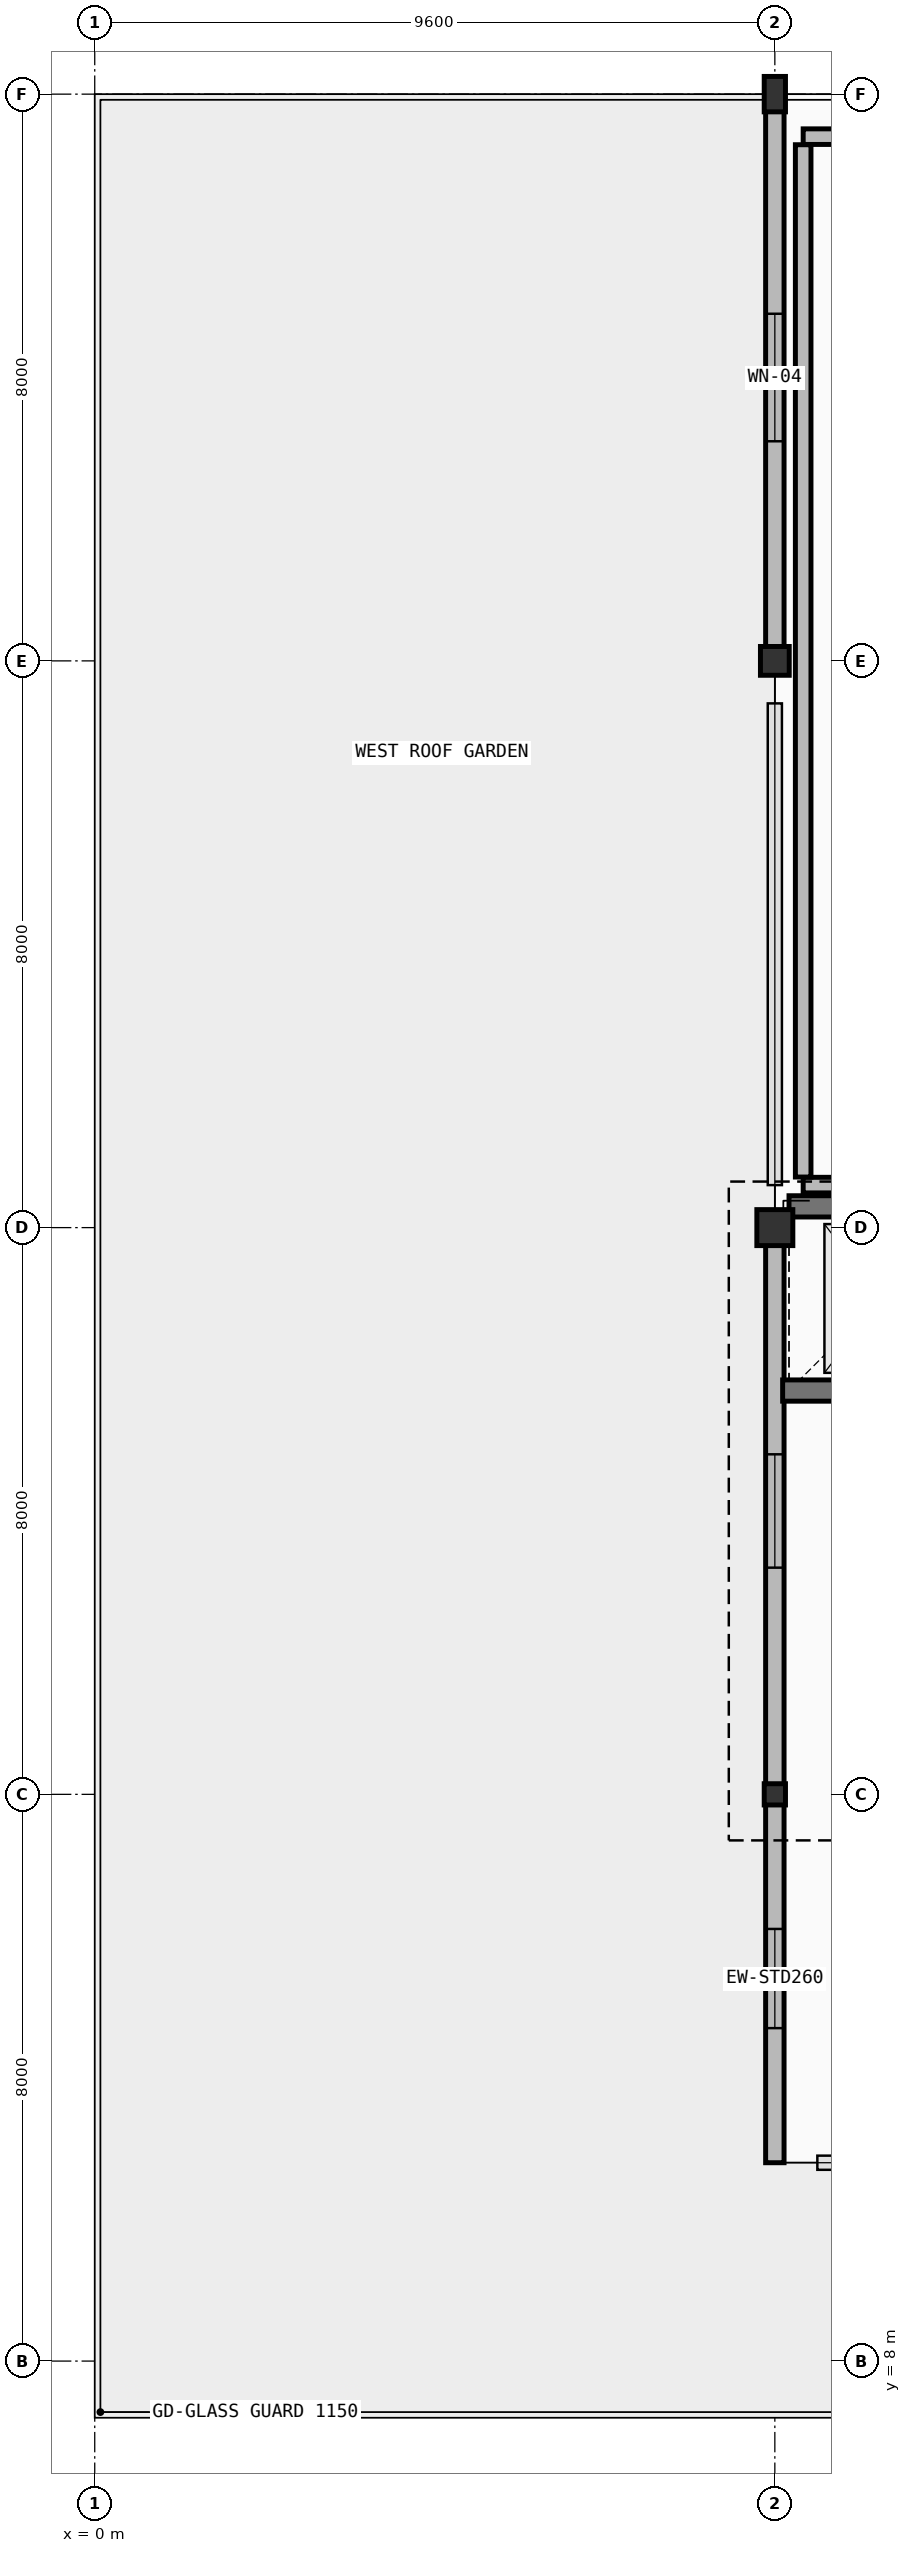
"""IFC4 building model, lengths in metres.
Left out: names, types, materials, properties, quantities, classifications, styles, units other than length and angle.
Written with IfcOpenShell. Run it as: python <this file> out.ifc"""

import sys

from ifc_helpers import new_model, si_unit, direction, frame, frame_2d, origin, origin_2d, place, context, subcontext, project, spatial, rectangle, hollow_circle, i_section, extrude, element, fill, save


model = new_model("IFC4")
c1 = context("Model", 3, precision=1e-05, world=origin(), true_north=direction((0.0, 1.0)))
c2 = subcontext(c1, "Body", "Model", "MODEL_VIEW")
j1 = project(units=[si_unit("LENGTHUNIT", "METRE"), si_unit("PLANEANGLEUNIT", "RADIAN")], contexts=[c1])
p1 = place(None, origin())
s1 = spatial("IfcSite", under=j1, at=p1, CompositionType="ELEMENT")
p2 = place(p1, origin())
s2 = spatial("IfcBuilding", under=s1, at=p2, CompositionType="ELEMENT")
p3 = place(p2, frame((0.0, 0.0, 24.9)))
s3 = spatial("IfcBuildingStorey", under=s2, at=p3, CompositionType="ELEMENT", Elevation=24.9)
p4 = place(p3, frame((9.6, 16.0, 0.0), z_axis=(0.0, 0.0, 1.0), x_axis=(1.0, 0.0, 0.0)))
e1 = element("IfcColumn", 1, at=p4, inside=s3, PredefinedType="COLUMN", context=c2, shape_type="SweptSolid", body=[
    extrude(i_section(OverallWidth=0.3, OverallDepth=0.3, WebThickness=0.011, FlangeThickness=0.019, FilletRadius=0.027, at=origin_2d()), origin(), (0.0, 0.0, 1.0), 4.5),
])
p5 = place(p3, frame((9.6, 24.0, 0.0), z_axis=(0.0, 0.0, 1.0), x_axis=(1.0, 0.0, 0.0)))
e2 = element("IfcColumn", 2, at=p5, inside=s3, PredefinedType="COLUMN", context=c2, shape_type="SweptSolid", body=[
    extrude(hollow_circle(Radius=0.254, WallThickness=0.025, at=origin_2d()), origin(), (0.0, 0.0, 1.0), 4.5),
])
p6 = place(p3, frame((9.6, 32.0, 0.0), z_axis=(0.0, 0.0, 1.0), x_axis=(1.0, 0.0, 0.0)))
e3 = element("IfcColumn", 3, at=p6, inside=s3, PredefinedType="COLUMN", context=c2, shape_type="SweptSolid", body=[
    extrude(hollow_circle(Radius=0.203, WallThickness=0.02, at=origin_2d()), origin(), (0.0, 0.0, 1.0), 4.5),
])
p7 = place(p3, frame((9.6, 40.0, 0.0), z_axis=(0.0, 0.0, 1.0), x_axis=(1.0, 0.0, 0.0)))
e4 = element("IfcColumn", 4, at=p7, inside=s3, PredefinedType="COLUMN", context=c2, shape_type="SweptSolid", body=[
    extrude(i_section(OverallWidth=0.3, OverallDepth=0.5, WebThickness=0.014, FlangeThickness=0.028, FilletRadius=0.027, at=origin_2d()), origin(), (0.0, 0.0, 1.0), 4.5),
])
p8 = place(p3, frame((9.6, 10.8, 0.0), z_axis=(0.0, 0.0, 1.0), x_axis=(0.0, 1.0, 0.0)))
e5 = element("IfcWall", 5, at=p8, inside=s3, PredefinedType="STANDARD", context=c2, shape_type="SweptSolid", body=[
    extrude(rectangle(XDim=5.2, YDim=0.26, at=frame_2d((2.6, 0.0))), origin(), (0.0, 0.0, 1.0), 4.26),
])
p9 = place(p8, frame((1.9, 0.0, 0.9)))
e6 = element("IfcOpeningElement", 6, at=p9, cuts=e5, PredefinedType="OPENING", context=c2, shape_type="SweptSolid", body=[
    extrude(rectangle(XDim=1.4, YDim=1.9, at=frame_2d((0.7, 0.95))), frame((0.0, 0.14, 0.0), z_axis=(0.0, -1.0, 0.0), x_axis=(1.0, 0.0, 0.0)), (0.0, 0.0, 1.0), 0.28),
])
p10 = place(p3, frame((9.6, 16.0, 0.0), z_axis=(0.0, 0.0, 1.0), x_axis=(0.0, 1.0, 0.0)))
e7 = element("IfcWall", 7, at=p10, inside=s3, PredefinedType="STANDARD", context=c2, shape_type="SweptSolid", body=[
    extrude(rectangle(XDim=8.0, YDim=0.26, at=frame_2d((4.0, 0.0))), origin(), (0.0, 0.0, 1.0), 3.79),
])
p11 = place(p10, frame((3.2, 0.0, 0.9)))
e8 = element("IfcOpeningElement", 8, at=p11, cuts=e7, PredefinedType="OPENING", context=c2, shape_type="SweptSolid", body=[
    extrude(rectangle(XDim=1.6, YDim=2.0, at=frame_2d((0.8, 1.0))), frame((0.0, 0.14, 0.0), z_axis=(0.0, -1.0, 0.0), x_axis=(1.0, 0.0, 0.0)), (0.0, 0.0, 1.0), 0.28),
])
p12 = place(p3, frame((9.6, 32.0, 0.0), z_axis=(0.0, 0.0, 1.0), x_axis=(0.0, 1.0, 0.0)))
e9 = element("IfcWall", 9, at=p12, inside=s3, PredefinedType="STANDARD", context=c2, shape_type="SweptSolid", body=[
    extrude(rectangle(XDim=8.0, YDim=0.26, at=frame_2d((4.0, 0.0))), origin(), (0.0, 0.0, 1.0), 3.78),
])
p13 = place(p12, frame((3.1, 0.0, 0.9)))
e10 = element("IfcOpeningElement", 10, at=p13, cuts=e9, PredefinedType="OPENING", context=c2, shape_type="SweptSolid", body=[
    extrude(rectangle(XDim=1.8, YDim=2.1, at=frame_2d((0.9, 1.05))), frame((0.0, 0.14, 0.0), z_axis=(0.0, -1.0, 0.0), x_axis=(1.0, 0.0, 0.0)), (0.0, 0.0, 1.0), 0.28),
])
p14 = place(p3, frame((12.4, 24.3, 0.0), z_axis=(0.0, 0.0, 1.0), x_axis=(-1.0, 0.0, 0.0)))
e11 = element("IfcWall", 11, at=p14, inside=s3, PredefinedType="SHEAR", context=c2, shape_type="SweptSolid", body=[
    extrude(rectangle(XDim=2.6, YDim=0.3, at=frame_2d((1.3, 0.0))), origin(), (0.0, 0.0, 1.0), 4.26),
])
p15 = place(p3, frame((9.71, 21.7, 0.0), z_axis=(0.0, 0.0, 1.0), x_axis=(1.0, 0.0, 0.0)))
e12 = element("IfcWall", 12, at=p15, inside=s3, PredefinedType="SHEAR", context=c2, shape_type="SweptSolid", body=[
    extrude(rectangle(XDim=1.49, YDim=0.3, at=frame_2d((0.745, 0.0))), origin(), (0.0, 0.0, 1.0), 4.27),
])
p16 = place(p3, frame((10.0, 24.6, 0.0), z_axis=(0.0, 0.0, 1.0), x_axis=(1.0, 0.0, 0.0)))
e13 = element("IfcWall", 13, at=p16, inside=s3, PredefinedType="PARTITIONING", context=c2, shape_type="SweptSolid", body=[
    extrude(rectangle(XDim=18.4, YDim=0.22, at=frame_2d((9.2, 0.0))), origin(), (0.0, 0.0, 1.0), 3.33),
])
p17 = place(p16, frame((10.998, 0.0, 0.0)))
e14 = element("IfcOpeningElement", 14, at=p17, cuts=e13, PredefinedType="OPENING", context=c2, shape_type="SweptSolid", body=[
    extrude(rectangle(XDim=1.48, YDim=2.16, at=frame_2d((0.74, 1.08))), frame((0.0, 0.12, 0.0), z_axis=(0.0, -1.0, 0.0), x_axis=(1.0, 0.0, 0.0)), (0.0, 0.0, 1.0), 0.24),
])
p18 = place(p16, frame((13.634, 0.0, 0.0)))
e15 = element("IfcOpeningElement", 15, at=p18, cuts=e13, PredefinedType="OPENING", context=c2, shape_type="SweptSolid", body=[
    extrude(rectangle(XDim=0.92, YDim=2.15, at=frame_2d((0.46, 1.075))), frame((0.0, 0.12, 0.0), z_axis=(0.0, -1.0, 0.0), x_axis=(1.0, 0.0, 0.0)), (0.0, 0.0, 1.0), 0.24),
])
p19 = place(p3, frame((28.286, 39.4, 0.0), z_axis=(0.0, 0.0, 1.0), x_axis=(-1.0, 0.0, 0.0)))
e16 = element("IfcWall", 16, at=p19, inside=s3, PredefinedType="PARTITIONING", context=c2, shape_type="SweptSolid", body=[
    extrude(rectangle(XDim=18.286, YDim=0.22, at=frame_2d((9.143, 0.0))), origin(), (0.0, 0.0, 1.0), 3.53),
])
p20 = place(p3, frame((10.0, 39.286, 0.0), z_axis=(0.0, 0.0, 1.0), x_axis=(0.0, -1.0, 0.0)))
e17 = element("IfcWall", 17, at=p20, inside=s3, PredefinedType="PARTITIONING", context=c2, shape_type="SweptSolid", body=[
    extrude(rectangle(XDim=14.572, YDim=0.22, at=frame_2d((7.286, 0.0))), origin(), (0.0, 0.0, 1.0), 3.43),
])
p21 = place(p9, origin())
e18 = element("IfcWindow", 18, at=p21, inside=s3, PartitioningType="SINGLE_PANEL", PredefinedType="WINDOW", context=c2, shape_type="SweptSolid", body=[
    extrude(rectangle(XDim=1.4, YDim=1.9, at=frame_2d((0.7, 0.95))), frame((0.0, 0.03, 0.0), z_axis=(0.0, -1.0, 0.0), x_axis=(1.0, 0.0, 0.0)), (0.0, 0.0, 1.0), 0.06),
])
fill(e6, e18)
p22 = place(p11, origin())
e19 = element("IfcWindow", 19, at=p22, inside=s3, PartitioningType="SINGLE_PANEL", PredefinedType="WINDOW", context=c2, shape_type="SweptSolid", body=[
    extrude(rectangle(XDim=1.6, YDim=2.0, at=frame_2d((0.8, 1.0))), frame((0.0, 0.03, 0.0), z_axis=(0.0, -1.0, 0.0), x_axis=(1.0, 0.0, 0.0)), (0.0, 0.0, 1.0), 0.06),
])
fill(e8, e19)
p23 = place(p13, origin())
e20 = element("IfcWindow", 20, at=p23, inside=s3, PartitioningType="SINGLE_PANEL", PredefinedType="WINDOW", context=c2, shape_type="SweptSolid", body=[
    extrude(rectangle(XDim=1.8, YDim=2.1, at=frame_2d((0.9, 1.05))), frame((0.0, 0.03, 0.0), z_axis=(0.0, -1.0, 0.0), x_axis=(1.0, 0.0, 0.0)), (0.0, 0.0, 1.0), 0.06),
])
fill(e10, e20)
save(model, sys.argv[1])
